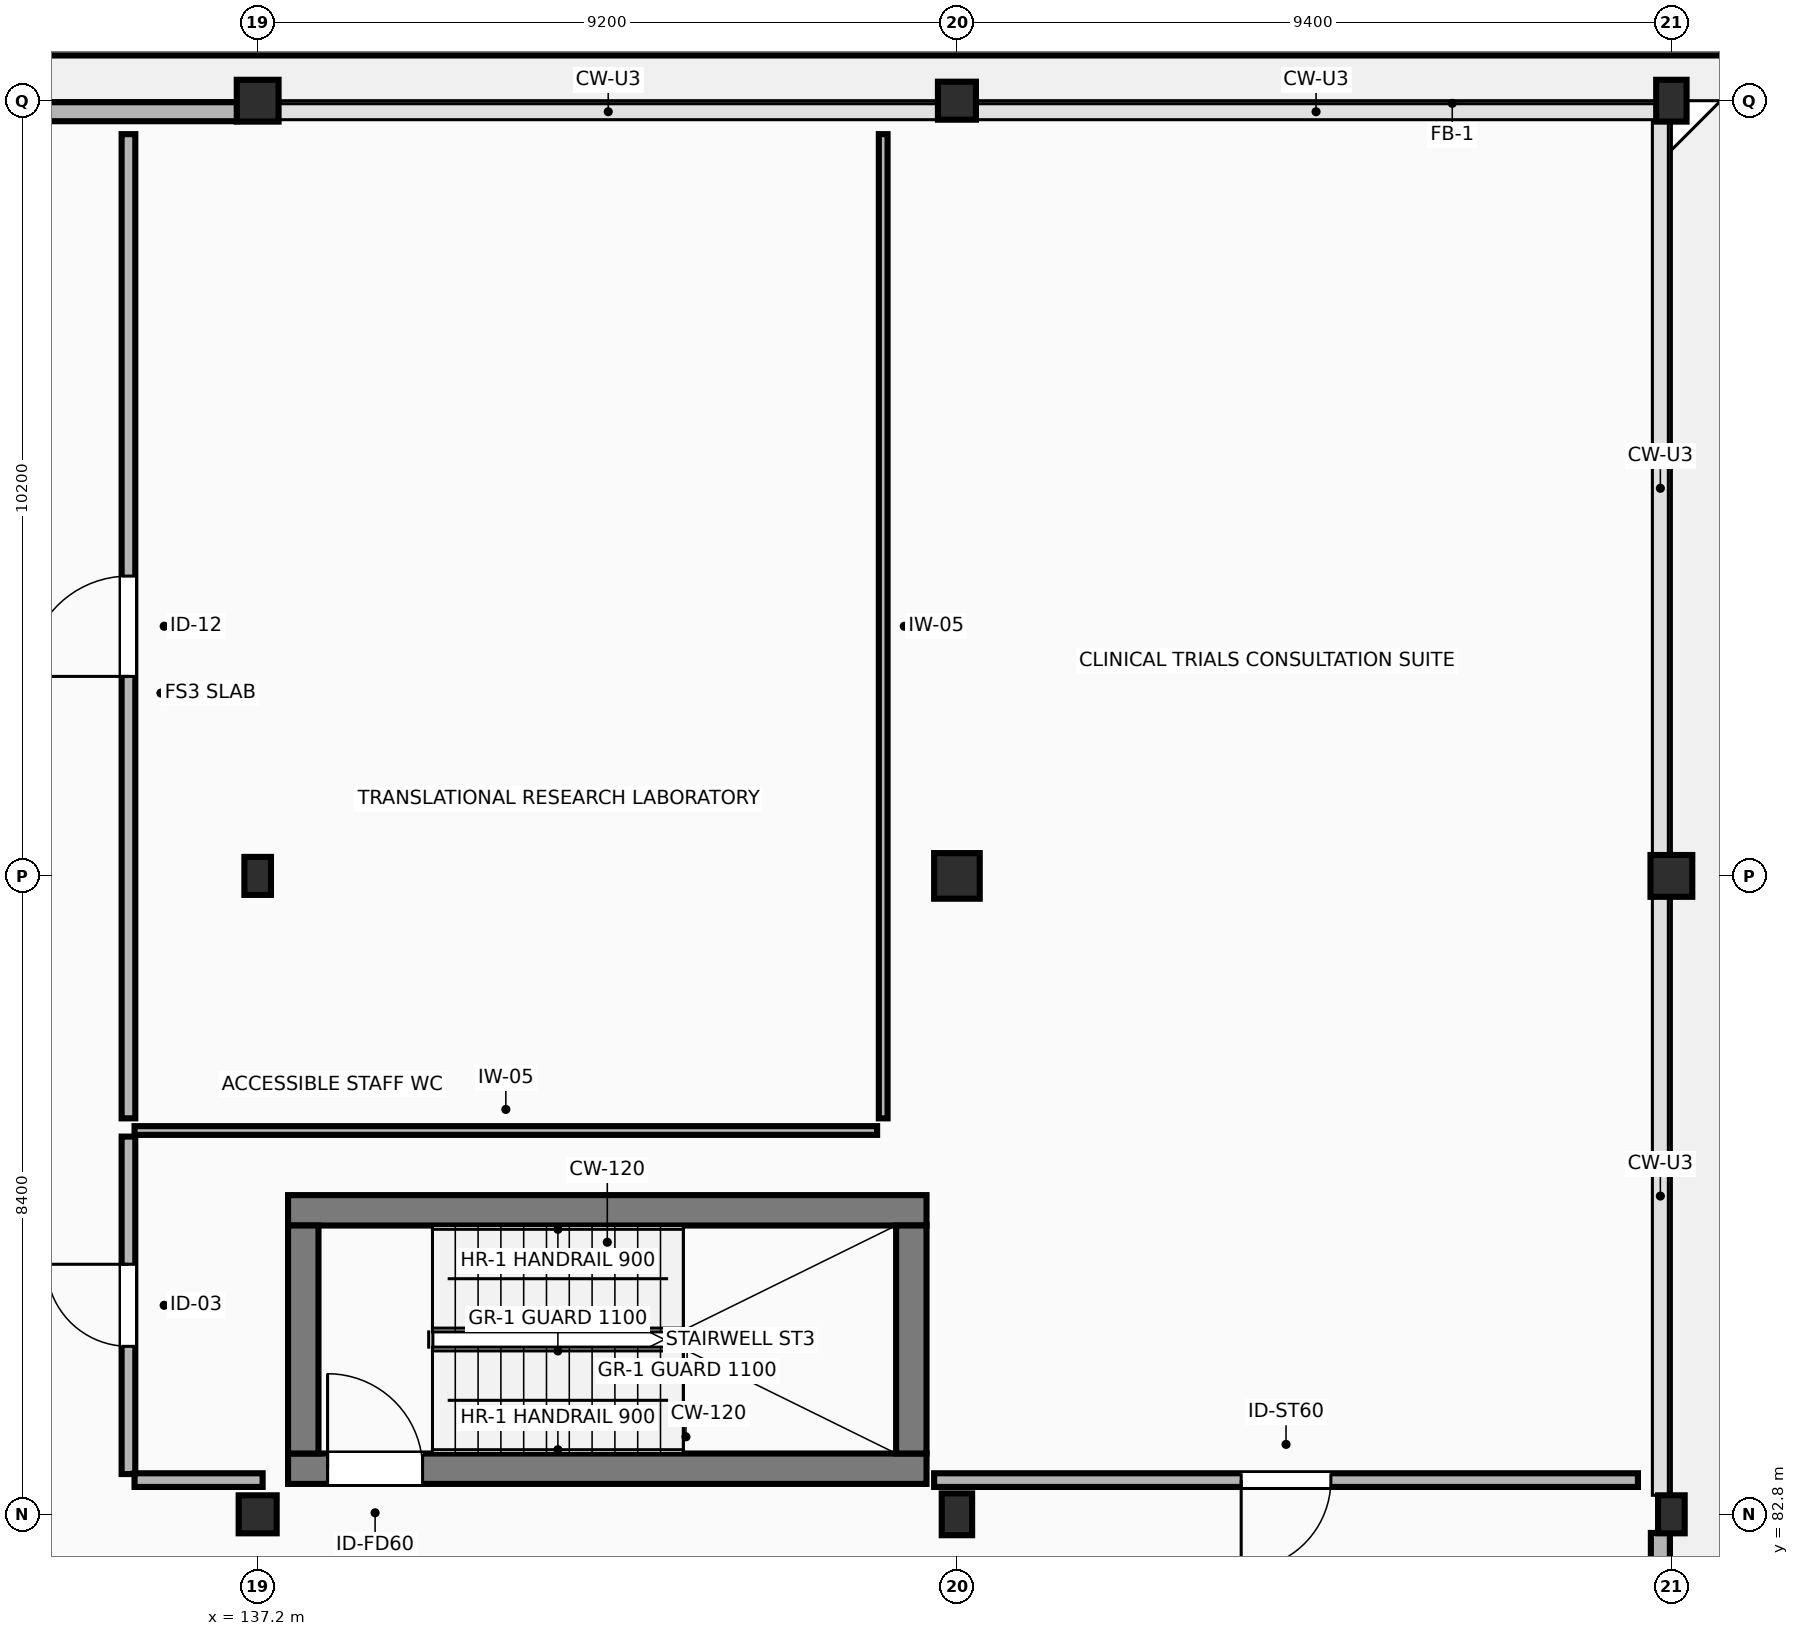
"""IFC4 building model, lengths in metres.
Left out: names, types, materials, properties, quantities, classifications, styles, units other than length and angle.
Written with IfcOpenShell. Run it as: python <this file> out.ifc"""

import sys

from ifc_helpers import new_model, si_unit, direction, frame, frame_2d, origin, origin_2d, place, context, subcontext, project, spatial, rectangle, extrude, element, fill, save


model = new_model("IFC4")
c1 = context("Model", 3, precision=1e-05, world=origin(), true_north=direction((0.0, 1.0)))
c2 = subcontext(c1, "Body", "Model", "MODEL_VIEW")
j1 = project(units=[si_unit("LENGTHUNIT", "METRE"), si_unit("PLANEANGLEUNIT", "RADIAN")], contexts=[c1])
p1 = place(None, origin())
s1 = spatial("IfcSite", under=j1, at=p1, CompositionType="ELEMENT")
p2 = place(p1, origin())
s2 = spatial("IfcBuilding", under=s1, at=p2, CompositionType="ELEMENT")
p3 = place(p2, frame((0.0, 0.0, 5.4)))
s3 = spatial("IfcBuildingStorey", under=s2, at=p3, CompositionType="ELEMENT", Elevation=5.4)
p4 = place(p3, frame((137.2, 82.8, 0.0), z_axis=(0.0, 0.0, 1.0), x_axis=(1.0, 0.0, 0.0)))
e1 = element("IfcColumn", 1, at=p4, inside=s3, PredefinedType="COLUMN", context=c2, shape_type="SweptSolid", body=[
    extrude(rectangle(XDim=0.5, YDim=0.5, at=origin_2d()), origin(), (0.0, 0.0, 1.0), 4.2),
])
p5 = place(p3, frame((137.2, 91.2, 0.0), z_axis=(0.0, 0.0, 1.0), x_axis=(1.0, 0.0, 0.0)))
e2 = element("IfcColumn", 2, at=p5, inside=s3, PredefinedType="COLUMN", context=c2, shape_type="SweptSolid", body=[
    extrude(rectangle(XDim=0.35, YDim=0.5, at=origin_2d()), origin(), (0.0, 0.0, 1.0), 4.2),
])
p6 = place(p3, frame((137.2, 101.4, 0.0), z_axis=(0.0, 0.0, 1.0), x_axis=(1.0, 0.0, 0.0)))
e3 = element("IfcColumn", 3, at=p6, inside=s3, PredefinedType="COLUMN", context=c2, shape_type="SweptSolid", body=[
    extrude(rectangle(XDim=0.55, YDim=0.55, at=origin_2d()), origin(), (0.0, 0.0, 1.0), 4.2),
])
p7 = place(p3, frame((146.4, 82.8, 0.0), z_axis=(0.0, 0.0, 1.0), x_axis=(1.0, 0.0, 0.0)))
e4 = element("IfcColumn", 4, at=p7, inside=s3, PredefinedType="COLUMN", context=c2, shape_type="SweptSolid", body=[
    extrude(rectangle(XDim=0.4, YDim=0.55, at=origin_2d()), origin(), (0.0, 0.0, 1.0), 4.2),
])
p8 = place(p3, frame((146.4, 91.2, 0.0), z_axis=(0.0, 0.0, 1.0), x_axis=(1.0, 0.0, 0.0)))
e5 = element("IfcColumn", 5, at=p8, inside=s3, PredefinedType="COLUMN", context=c2, shape_type="SweptSolid", body=[
    extrude(rectangle(XDim=0.6, YDim=0.6, at=origin_2d()), origin(), (0.0, 0.0, 1.0), 4.2),
])
p9 = place(p3, frame((146.4, 101.4, 0.0), z_axis=(0.0, 0.0, 1.0), x_axis=(1.0, 0.0, 0.0)))
e6 = element("IfcColumn", 6, at=p9, inside=s3, PredefinedType="COLUMN", context=c2, shape_type="SweptSolid", body=[
    extrude(rectangle(XDim=0.5, YDim=0.5, at=origin_2d()), origin(), (0.0, 0.0, 1.0), 4.2),
])
p10 = place(p3, frame((155.8, 82.8, 0.0), z_axis=(0.0, 0.0, 1.0), x_axis=(1.0, 0.0, 0.0)))
e7 = element("IfcColumn", 7, at=p10, inside=s3, PredefinedType="COLUMN", context=c2, shape_type="SweptSolid", body=[
    extrude(rectangle(XDim=0.35, YDim=0.5, at=origin_2d()), origin(), (0.0, 0.0, 1.0), 4.2),
])
p11 = place(p3, frame((155.8, 91.2, 0.0), z_axis=(0.0, 0.0, 1.0), x_axis=(1.0, 0.0, 0.0)))
e8 = element("IfcColumn", 8, at=p11, inside=s3, PredefinedType="COLUMN", context=c2, shape_type="SweptSolid", body=[
    extrude(rectangle(XDim=0.55, YDim=0.55, at=origin_2d()), origin(), (0.0, 0.0, 1.0), 4.2),
])
p12 = place(p3, frame((155.8, 101.4, 0.0), z_axis=(0.0, 0.0, 1.0), x_axis=(1.0, 0.0, 0.0)))
e9 = element("IfcColumn", 9, at=p12, inside=s3, PredefinedType="COLUMN", context=c2, shape_type="SweptSolid", body=[
    extrude(rectangle(XDim=0.4, YDim=0.55, at=origin_2d()), origin(), (0.0, 0.0, 1.0), 4.2),
])
p13 = place(p3, frame((155.655, 73.445, 0.0), z_axis=(0.0, 0.0, 1.0), x_axis=(0.0, 1.0, 0.0)))
e10 = element("IfcWall", 10, at=p13, inside=s3, PredefinedType="STANDARD", context=c2, shape_type="SweptSolid", body=[
    extrude(rectangle(XDim=9.11, YDim=0.25, at=frame_2d((4.555, 0.0))), origin(), (0.0, 0.0, 1.0), 3.245),
])
p14 = place(p13, frame((1.983, 0.0, 0.95)))
e11 = element("IfcOpeningElement", 11, at=p14, cuts=e10, PredefinedType="OPENING", context=c2, shape_type="SweptSolid", body=[
    extrude(rectangle(XDim=1.5, YDim=1.65, at=frame_2d((0.75, 0.825))), frame((0.0, 0.135, 0.0), z_axis=(0.0, -1.0, 0.0), x_axis=(1.0, 0.0, 0.0)), (0.0, 0.0, 1.0), 0.27),
])
p15 = place(p13, frame((5.627, 0.0, 0.95)))
e12 = element("IfcOpeningElement", 12, at=p15, cuts=e10, PredefinedType="OPENING", context=c2, shape_type="SweptSolid", body=[
    extrude(rectangle(XDim=1.5, YDim=1.65, at=frame_2d((0.75, 0.825))), frame((0.0, 0.135, 0.0), z_axis=(0.0, -1.0, 0.0), x_axis=(1.0, 0.0, 0.0)), (0.0, 0.0, 1.0), 0.27),
])
p16 = place(p3, frame((136.93, 101.255, 0.0), z_axis=(0.0, 0.0, 1.0), x_axis=(-1.0, 0.0, 0.0)))
e13 = element("IfcWall", 13, at=p16, inside=s3, PredefinedType="STANDARD", context=c2, shape_type="SweptSolid", body=[
    extrude(rectangle(XDim=8.295, YDim=0.25, at=frame_2d((4.147, 0.0))), origin(), (0.0, 0.0, 1.0), 3.185),
])
p17 = place(p16, frame((3.248, 0.0, 0.95)))
e14 = element("IfcOpeningElement", 14, at=p17, cuts=e13, PredefinedType="OPENING", context=c2, shape_type="SweptSolid", body=[
    extrude(rectangle(XDim=1.8, YDim=1.5, at=frame_2d((0.9, 0.75))), frame((0.0, 0.135, 0.0), z_axis=(0.0, -1.0, 0.0), x_axis=(1.0, 0.0, 0.0)), (0.0, 0.0, 1.0), 0.27),
])
p18 = place(p3, frame((128.7, 102.1, 0.0), z_axis=(0.0, 0.0, 1.0), x_axis=(1.0, 0.0, 0.0)))
e15 = element("IfcWall", 15, at=p18, inside=s3, PredefinedType="PARAPET", context=c2, shape_type="SweptSolid", body=[
    extrude(rectangle(XDim=35.65, YDim=0.21, at=frame_2d((17.825, 0.0))), origin(), (0.0, 0.0, 1.0), 1.05),
])
p19 = place(p3, frame((137.6, 83.4, 0.0), z_axis=(0.0, 0.0, 1.0), x_axis=(1.0, 0.0, 0.0)))
e16 = element("IfcWall", 16, at=p19, inside=s3, PredefinedType="SHEAR", context=c2, shape_type="SweptSolid", body=[
    extrude(rectangle(XDim=8.4, YDim=0.4, at=frame_2d((4.2, 0.0))), origin(), (0.0, 0.0, 1.0), 3.9),
])
p20 = place(p19, frame((0.52, 0.0, 0.0)))
e17 = element("IfcOpeningElement", 17, at=p20, cuts=e16, PredefinedType="OPENING", context=c2, shape_type="SweptSolid", body=[
    extrude(rectangle(XDim=1.25, YDim=2.2, at=frame_2d((0.625, 1.1))), frame((0.0, 0.21, 0.0), z_axis=(0.0, -1.0, 0.0), x_axis=(1.0, 0.0, 0.0)), (0.0, 0.0, 1.0), 0.42),
])
p21 = place(p3, frame((146.0, 86.8, 0.0), z_axis=(0.0, 0.0, 1.0), x_axis=(-1.0, 0.0, 0.0)))
e18 = element("IfcWall", 18, at=p21, inside=s3, PredefinedType="SHEAR", context=c2, shape_type="SweptSolid", body=[
    extrude(rectangle(XDim=8.4, YDim=0.4, at=frame_2d((4.2, 0.0))), origin(), (0.0, 0.0, 1.0), 3.9),
])
for number, where, z_axis, x_axis in (
    (19, (137.8, 83.6, 0.0), (0.0, 0.0, 1.0), (0.0, 1.0, 0.0)),
    (20, (145.8, 86.6, 0.0), (0.0, 0.0, 1.0), (0.0, -1.0, 0.0)),
):
    element("IfcWall", number, at=place(p3, frame(where, z_axis=z_axis, x_axis=x_axis)), inside=s3, PredefinedType="SHEAR", context=c2, shape_type="SweptSolid", body=[
        extrude(rectangle(XDim=3.0, YDim=0.4, at=frame_2d((1.5, 0.0))), origin(), (0.0, 0.0, 1.0), 3.9),
    ])
p22 = place(p3, frame((135.5, 83.33, 0.0), z_axis=(0.0, 0.0, 1.0), x_axis=(0.0, 1.0, 0.0)))
e21 = element("IfcWall", 21, at=p22, inside=s3, PredefinedType="PARTITIONING", context=c2, shape_type="SweptSolid", body=[
    extrude(rectangle(XDim=4.44, YDim=0.18, at=frame_2d((2.22, 0.0))), origin(), (0.0, 0.0, 1.0), 3.9),
])
p23 = place(p22, frame((1.68, 0.0, 0.0)))
e22 = element("IfcOpeningElement", 22, at=p23, cuts=e21, PredefinedType="OPENING", context=c2, shape_type="SweptSolid", body=[
    extrude(rectangle(XDim=1.08, YDim=2.2, at=frame_2d((0.54, 1.1))), frame((0.0, 0.1, 0.0), z_axis=(0.0, -1.0, 0.0), x_axis=(1.0, 0.0, 0.0)), (0.0, 0.0, 1.0), 0.2),
])
p24 = place(p3, frame((135.58, 87.85, 0.0), z_axis=(0.0, 0.0, 1.0), x_axis=(1.0, 0.0, 0.0)))
e23 = element("IfcWall", 23, at=p24, inside=s3, PredefinedType="PARTITIONING", context=c2, shape_type="SweptSolid", body=[
    extrude(rectangle(XDim=9.77, YDim=0.115, at=frame_2d((4.885, 0.0))), origin(), (0.0, 0.0, 1.0), 3.9),
])
p25 = place(p3, frame((137.265, 83.25, 0.0), z_axis=(0.0, 0.0, 1.0), x_axis=(-1.0, 0.0, 0.0)))
e24 = element("IfcWall", 24, at=p25, inside=s3, PredefinedType="PARTITIONING", context=c2, shape_type="SweptSolid", body=[
    extrude(rectangle(XDim=1.685, YDim=0.18, at=frame_2d((0.842, 0.0))), origin(), (0.0, 0.0, 1.0), 3.235),
])
p26 = place(p3, frame((145.43, 100.96, 0.0), z_axis=(0.0, 0.0, 1.0), x_axis=(0.0, -1.0, 0.0)))
e25 = element("IfcWall", 25, at=p26, inside=s3, PredefinedType="PARTITIONING", context=c2, shape_type="SweptSolid", body=[
    extrude(rectangle(XDim=12.95, YDim=0.115, at=frame_2d((6.475, 0.0))), origin(), (0.0, 0.0, 1.0), 3.9),
])
p27 = place(p3, frame((135.5, 88.01, 0.0), z_axis=(0.0, 0.0, 1.0), x_axis=(0.0, 1.0, 0.0)))
e26 = element("IfcWall", 26, at=p27, inside=s3, PredefinedType="PARTITIONING", context=c2, shape_type="SweptSolid", body=[
    extrude(rectangle(XDim=12.95, YDim=0.18, at=frame_2d((6.475, 0.0))), origin(), (0.0, 0.0, 1.0), 3.9),
])
p28 = place(p27, frame((5.815, 0.0, 0.0)))
e27 = element("IfcOpeningElement", 27, at=p28, cuts=e26, PredefinedType="OPENING", context=c2, shape_type="SweptSolid", body=[
    extrude(rectangle(XDim=1.32, YDim=2.22, at=frame_2d((0.66, 1.11))), frame((0.0, 0.1, 0.0), z_axis=(0.0, -1.0, 0.0), x_axis=(1.0, 0.0, 0.0)), (0.0, 0.0, 1.0), 0.2),
])
p29 = place(p3, frame((155.36, 83.25, 0.0), z_axis=(0.0, 0.0, 1.0), x_axis=(-1.0, 0.0, 0.0)))
e28 = element("IfcWall", 28, at=p29, inside=s3, PredefinedType="PARTITIONING", context=c2, shape_type="SweptSolid", body=[
    extrude(rectangle(XDim=9.26, YDim=0.18, at=frame_2d((4.63, 0.0))), origin(), (0.0, 0.0, 1.0), 3.205),
])
p30 = place(p29, frame((4.04, 0.0, 0.0)))
e29 = element("IfcOpeningElement", 29, at=p30, cuts=e28, PredefinedType="OPENING", context=c2, shape_type="SweptSolid", body=[
    extrude(rectangle(XDim=1.18, YDim=2.18, at=frame_2d((0.59, 1.09))), frame((0.0, 0.1, 0.0), z_axis=(0.0, -1.0, 0.0), x_axis=(1.0, 0.0, 0.0)), (0.0, 0.0, 1.0), 0.2),
])
p31 = place(p20, origin())
e30 = element("IfcDoor", 30, at=p31, inside=s3, OperationType="SINGLE_SWING_LEFT", PredefinedType="DOOR", context=c2, shape_type="SweptSolid", body=[
    extrude(rectangle(XDim=1.25, YDim=2.2, at=frame_2d((0.625, 1.1))), frame((0.0, 0.025, 0.0), z_axis=(0.0, -1.0, 0.0), x_axis=(1.0, 0.0, 0.0)), (0.0, 0.0, 1.0), 0.05),
])
fill(e17, e30)
p32 = place(p23, origin())
e31 = element("IfcDoor", 31, at=p32, inside=s3, OperationType="SINGLE_SWING_RIGHT", PredefinedType="DOOR", context=c2, shape_type="SweptSolid", body=[
    extrude(rectangle(XDim=1.08, YDim=2.2, at=frame_2d((0.54, 1.1))), frame((0.0, 0.025, 0.0), z_axis=(0.0, -1.0, 0.0), x_axis=(1.0, 0.0, 0.0)), (0.0, 0.0, 1.0), 0.05),
])
fill(e22, e31)
p33 = place(p28, origin())
e32 = element("IfcDoor", 32, at=p33, inside=s3, OperationType="SINGLE_SWING_LEFT", PredefinedType="DOOR", context=c2, shape_type="SweptSolid", body=[
    extrude(rectangle(XDim=1.32, YDim=2.22, at=frame_2d((0.66, 1.11))), frame((0.0, 0.025, 0.0), z_axis=(0.0, -1.0, 0.0), x_axis=(1.0, 0.0, 0.0)), (0.0, 0.0, 1.0), 0.05),
])
fill(e27, e32)
p34 = place(p30, origin())
e33 = element("IfcDoor", 33, at=p34, inside=s3, OperationType="SINGLE_SWING_RIGHT", PredefinedType="DOOR", context=c2, shape_type="SweptSolid", body=[
    extrude(rectangle(XDim=1.18, YDim=2.18, at=frame_2d((0.59, 1.09))), frame((0.0, 0.025, 0.0), z_axis=(0.0, -1.0, 0.0), x_axis=(1.0, 0.0, 0.0)), (0.0, 0.0, 1.0), 0.05),
])
fill(e29, e33)
save(model, sys.argv[1])
